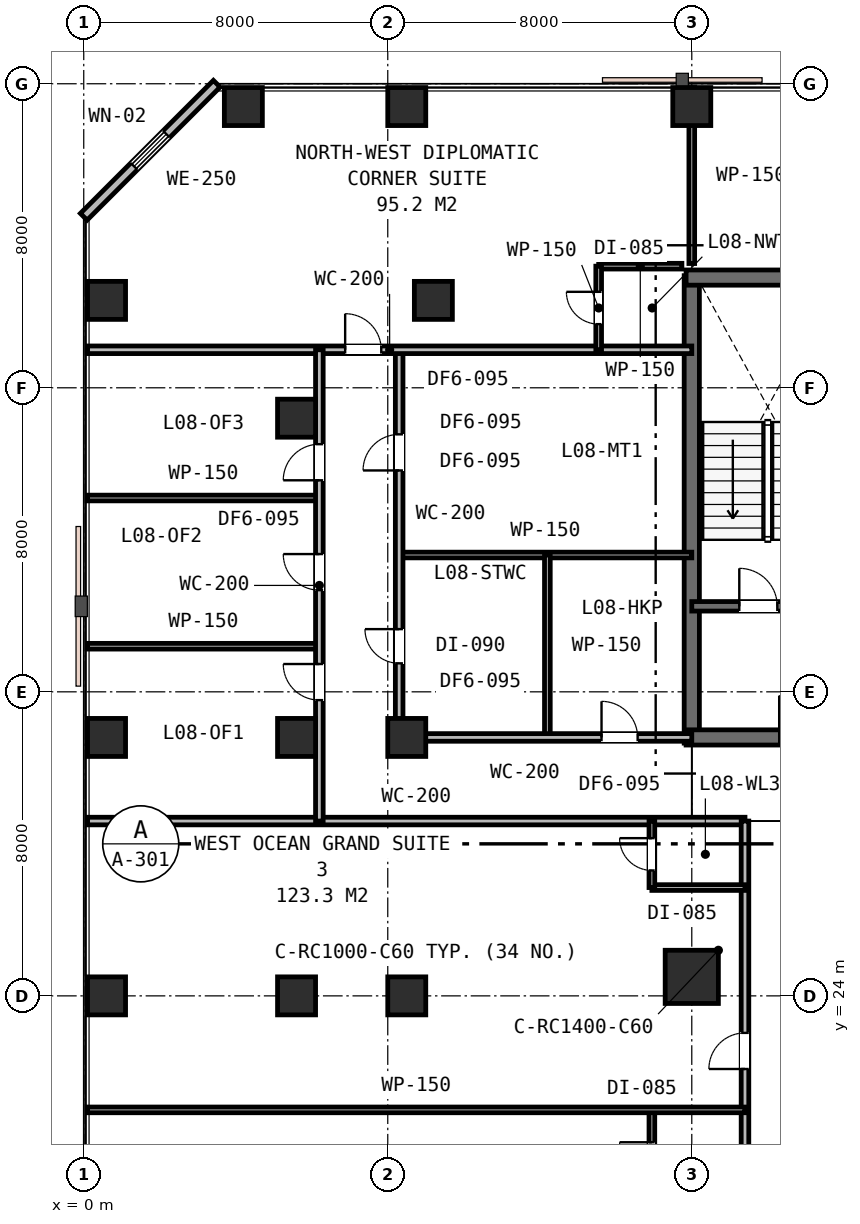
"""IFC4 building model, lengths in metres.
Left out: names, types, materials, properties, quantities, classifications, styles, units other than length and angle.
Written with IfcOpenShell. Run it as: python <this file> out.ifc"""

import sys

from ifc_helpers import new_model, si_unit, direction, frame, frame_2d, origin, origin_2d, place, context, subcontext, project, spatial, rectangle, extrude, element, fill, save


model = new_model("IFC4")
c1 = context("Model", 3, precision=1e-05, world=origin(), true_north=direction((0.0, 1.0)))
c2 = subcontext(c1, "Body", "Model", "MODEL_VIEW")
j1 = project(units=[si_unit("LENGTHUNIT", "METRE"), si_unit("PLANEANGLEUNIT", "RADIAN")], contexts=[c1])
p1 = place(None, origin())
s1 = spatial("IfcSite", under=j1, at=p1, CompositionType="ELEMENT")
p2 = place(p1, origin())
s2 = spatial("IfcBuilding", under=s1, at=p2, CompositionType="ELEMENT")
p3 = place(p2, frame((0.0, 0.0, 36.6)))
s3 = spatial("IfcBuildingStorey", under=s2, at=p3, CompositionType="ELEMENT", Elevation=36.6)
p4 = place(p3, frame((16.0, 30.65, 0.0), z_axis=(0.0, 0.0, 1.0), x_axis=(0.0, 1.0, 0.0)))
e1 = element("IfcWall", 1, at=p4, inside=s3, PredefinedType="SHEAR", context=c2, shape_type="SweptSolid", body=[
    extrude(rectangle(XDim=12.3, YDim=0.4, at=frame_2d((6.15, 0.0))), origin(), (0.0, 0.0, 1.0), 3.6),
])
p5 = place(p3, frame((15.85, 42.9, 0.0), z_axis=(0.0, 0.0, 1.0), x_axis=(1.0, 0.0, 0.0)))
e2 = element("IfcWall", 2, at=p5, inside=s3, PredefinedType="SHEAR", context=c2, shape_type="SweptSolid", body=[
    extrude(rectangle(XDim=24.3, YDim=0.4, at=frame_2d((12.15, 0.0))), origin(), (0.0, 0.0, 1.0), 3.6),
])
p6 = place(p3, frame((15.85, 30.8, 0.0), z_axis=(0.0, 0.0, 1.0), x_axis=(1.0, 0.0, 0.0)))
e3 = element("IfcWall", 3, at=p6, inside=s3, PredefinedType="SHEAR", context=c2, shape_type="SweptSolid", body=[
    extrude(rectangle(XDim=11.2, YDim=0.4, at=frame_2d((5.6, 0.0))), origin(), (0.0, 0.0, 1.0), 3.6),
])
p7 = place(p6, frame((2.45, 0.0, 0.0)))
e4 = element("IfcOpeningElement", 4, at=p7, cuts=e3, PredefinedType="OPENING", context=c2, shape_type="SweptSolid", body=[
    extrude(rectangle(XDim=1.1, YDim=2.15, at=frame_2d((0.55, 1.075))), frame((0.0, 0.21, 0.0), z_axis=(0.0, -1.0, 0.0), x_axis=(1.0, 0.0, 0.0)), (0.0, 0.0, 1.0), 0.42),
])
p8 = place(p3, frame((16.0, 34.25, 0.0), z_axis=(0.0, 0.0, 1.0), x_axis=(1.0, 0.0, 0.0)))
e5 = element("IfcWall", 5, at=p8, inside=s3, PredefinedType="SHEAR", context=c2, shape_type="SweptSolid", body=[
    extrude(rectangle(XDim=6.05, YDim=0.25, at=frame_2d((3.025, 0.0))), origin(), (0.0, 0.0, 1.0), 3.6),
])
p9 = place(p8, frame((1.25, 0.0, 0.0)))
e6 = element("IfcOpeningElement", 6, at=p9, cuts=e5, PredefinedType="OPENING", context=c2, shape_type="SweptSolid", body=[
    extrude(rectangle(XDim=1.0, YDim=2.15, at=frame_2d((0.5, 1.075))), frame((0.0, 0.135, 0.0), z_axis=(0.0, -1.0, 0.0), x_axis=(1.0, 0.0, 0.0)), (0.0, 0.0, 1.0), 0.27),
])
p10 = place(p8, frame((4.2, 0.0, 0.0)))
e7 = element("IfcOpeningElement", 7, at=p10, cuts=e5, PredefinedType="OPENING", context=c2, shape_type="SweptSolid", body=[
    extrude(rectangle(XDim=1.1, YDim=2.15, at=frame_2d((0.55, 1.075))), frame((0.0, 0.135, 0.0), z_axis=(0.0, -1.0, 0.0), x_axis=(1.0, 0.0, 0.0)), (0.0, 0.0, 1.0), 0.27),
])
p11 = place(p3, frame((8.5, 24.0, 0.0), z_axis=(0.0, 0.0, 1.0), x_axis=(1.0, 0.0, 0.0)))
e8 = element("IfcColumn", 8, at=p11, inside=s3, PredefinedType="COLUMN", context=c2, shape_type="SweptSolid", body=[
    extrude(rectangle(XDim=1.0, YDim=1.0, at=origin_2d()), origin(), (0.0, 0.0, 1.0), 3.6),
])
p12 = place(p3, frame((16.0, 24.5, 0.0), z_axis=(0.0, 0.0, 1.0), x_axis=(1.0, 0.0, 0.0)))
e9 = element("IfcColumn", 9, at=p12, inside=s3, PredefinedType="COLUMN", context=c2, shape_type="SweptSolid", body=[
    extrude(rectangle(XDim=1.4, YDim=1.4, at=origin_2d()), origin(), (0.0, 0.0, 1.0), 3.6),
])
for number, where, z_axis, x_axis in (
    (10, (5.6, 24.0, 0.0), (0.0, 0.0, 1.0), (1.0, 0.0, 0.0)),
    (11, (5.6, 30.8, 0.0), (0.0, 0.0, 1.0), (1.0, 0.0, 0.0)),
    (12, (5.6, 39.2, 0.0), (0.0, 0.0, 1.0), (1.0, 0.0, 0.0)),
    (13, (8.5, 30.8, 0.0), (0.0, 0.0, 1.0), (1.0, 0.0, 0.0)),
    (14, (9.2, 42.3, 0.0), (0.0, 0.0, 1.0), (1.0, 0.0, 0.0)),
    (15, (0.6, 24.0, 0.0), (0.0, 0.0, 1.0), (1.0, 0.0, 0.0)),
    (16, (0.6, 30.8, 0.0), (0.0, 0.0, 1.0), (1.0, 0.0, 0.0)),
    (17, (0.6, 42.3, 0.0), (0.0, 0.0, 1.0), (1.0, 0.0, 0.0)),
    (18, (4.2, 47.4, 0.0), (0.0, 0.0, 1.0), (1.0, 0.0, 0.0)),
    (19, (8.5, 47.4, 0.0), (0.0, 0.0, 1.0), (1.0, 0.0, 0.0)),
    (20, (16.0, 47.4, 0.0), (0.0, 0.0, 1.0), (1.0, 0.0, 0.0)),
):
    element("IfcColumn", number, at=place(p3, frame(where, z_axis=z_axis, x_axis=x_axis)), inside=s3, PredefinedType="COLUMN", context=c2, shape_type="SweptSolid", body=[
        extrude(rectangle(XDim=1.0, YDim=1.0, at=origin_2d()), origin(), (0.0, 0.0, 1.0), 3.6),
    ])
p13 = place(p3, frame((3.5, 48.0, 0.0), z_axis=(0.0, 0.0, 1.0), x_axis=(-0.707106781187, -0.707106781187, 0.0)))
e21 = element("IfcWall", 21, at=p13, inside=s3, PredefinedType="STANDARD", context=c2, shape_type="SweptSolid", body=[
    extrude(rectangle(XDim=4.95, YDim=0.25, at=frame_2d((2.475, 0.0))), origin(), (0.0, 0.0, 1.0), 3.33),
])
p14 = place(p13, frame((1.875, 0.0, 0.85)))
e22 = element("IfcOpeningElement", 22, at=p14, cuts=e21, PredefinedType="OPENING", context=c2, shape_type="SweptSolid", body=[
    extrude(rectangle(XDim=1.2, YDim=1.6, at=frame_2d((0.6, 0.8))), frame((0.0, 0.135, 0.0), z_axis=(0.0, -1.0, 0.0), x_axis=(1.0, 0.0, 0.0)), (0.0, 0.0, 1.0), 0.27),
])
p15 = place(p3, frame((0.1, 28.6, 0.0), z_axis=(0.0, 0.0, 1.0), x_axis=(1.0, 0.0, 0.0)))
e23 = element("IfcWall", 23, at=p15, inside=s3, PredefinedType="PARTITIONING", context=c2, shape_type="SweptSolid", body=[
    extrude(rectangle(XDim=17.3, YDim=0.2, at=frame_2d((8.65, 0.0))), origin(), (0.0, 0.0, 1.0), 2.82),
])
p16 = place(p3, frame((8.3, 35.6, 0.0), z_axis=(0.0, 0.0, 1.0), x_axis=(1.0, 0.0, 0.0)))
e24 = element("IfcWall", 24, at=p16, inside=s3, PredefinedType="PARTITIONING", context=c2, shape_type="SweptSolid", body=[
    extrude(rectangle(XDim=7.7, YDim=0.15, at=frame_2d((3.85, 0.0))), origin(), (0.0, 0.0, 1.0), 2.82),
])
p17 = place(p3, frame((12.2, 30.8, 0.0), z_axis=(0.0, 0.0, 1.0), x_axis=(0.0, 1.0, 0.0)))
e25 = element("IfcWall", 25, at=p17, inside=s3, PredefinedType="PARTITIONING", context=c2, shape_type="SweptSolid", body=[
    extrude(rectangle(XDim=4.8, YDim=0.15, at=frame_2d((2.4, 0.0))), origin(), (0.0, 0.0, 1.0), 2.82),
])
p18 = place(p3, frame((8.3, 30.8, 0.0), z_axis=(0.0, 0.0, 1.0), x_axis=(1.0, 0.0, 0.0)))
e26 = element("IfcWall", 26, at=p18, inside=s3, PredefinedType="PARTITIONING", context=c2, shape_type="SweptSolid", body=[
    extrude(rectangle(XDim=7.7, YDim=0.2, at=frame_2d((3.85, 0.0))), origin(), (0.0, 0.0, 1.0), 2.82),
])
p19 = place(p18, frame((5.325, 0.0, 0.0)))
e27 = element("IfcOpeningElement", 27, at=p19, cuts=e26, PredefinedType="OPENING", context=c2, shape_type="SweptSolid", body=[
    extrude(rectangle(XDim=0.95, YDim=2.15, at=frame_2d((0.475, 1.075))), frame((0.0, 0.11, 0.0), z_axis=(0.0, -1.0, 0.0), x_axis=(1.0, 0.0, 0.0)), (0.0, 0.0, 1.0), 0.22),
])
p20 = place(p3, frame((8.3, 30.8, 0.0), z_axis=(0.0, 0.0, 1.0), x_axis=(0.0, 1.0, 0.0)))
e28 = element("IfcWall", 28, at=p20, inside=s3, PredefinedType="PARTITIONING", context=c2, shape_type="SweptSolid", body=[
    extrude(rectangle(XDim=10.2, YDim=0.2, at=frame_2d((5.1, 0.0))), origin(), (0.0, 0.0, 1.0), 2.82),
])
p21 = place(p20, frame((1.95, 0.0, 0.0)))
e29 = element("IfcOpeningElement", 29, at=p21, cuts=e28, PredefinedType="OPENING", context=c2, shape_type="SweptSolid", body=[
    extrude(rectangle(XDim=0.9, YDim=2.15, at=frame_2d((0.45, 1.075))), frame((0.0, 0.11, 0.0), z_axis=(0.0, -1.0, 0.0), x_axis=(1.0, 0.0, 0.0)), (0.0, 0.0, 1.0), 0.22),
])
p22 = place(p20, frame((7.025, 0.0, 0.0)))
e30 = element("IfcOpeningElement", 30, at=p22, cuts=e28, PredefinedType="OPENING", context=c2, shape_type="SweptSolid", body=[
    extrude(rectangle(XDim=0.95, YDim=2.15, at=frame_2d((0.475, 1.075))), frame((0.0, 0.11, 0.0), z_axis=(0.0, -1.0, 0.0), x_axis=(1.0, 0.0, 0.0)), (0.0, 0.0, 1.0), 0.22),
])
p23 = place(p3, frame((0.1, 41.0, 0.0), z_axis=(0.0, 0.0, 1.0), x_axis=(1.0, 0.0, 0.0)))
e31 = element("IfcWall", 31, at=p23, inside=s3, PredefinedType="PARTITIONING", context=c2, shape_type="SweptSolid", body=[
    extrude(rectangle(XDim=15.9, YDim=0.2, at=frame_2d((7.95, 0.0))), origin(), (0.0, 0.0, 1.0), 2.82),
])
p24 = place(p23, frame((6.779, 0.0, 0.0)))
e32 = element("IfcOpeningElement", 32, at=p24, cuts=e31, PredefinedType="OPENING", context=c2, shape_type="SweptSolid", body=[
    extrude(rectangle(XDim=0.95, YDim=2.15, at=frame_2d((0.475, 1.075))), frame((0.0, 0.11, 0.0), z_axis=(0.0, -1.0, 0.0), x_axis=(1.0, 0.0, 0.0)), (0.0, 0.0, 1.0), 0.22),
])
p25 = place(p3, frame((13.55, 43.2, 0.0), z_axis=(0.0, 0.0, 1.0), x_axis=(1.0, 0.0, 0.0)))
e33 = element("IfcWall", 33, at=p25, inside=s3, PredefinedType="PARTITIONING", context=c2, shape_type="SweptSolid", body=[
    extrude(rectangle(XDim=2.19, YDim=0.15, at=frame_2d((1.095, 0.0))), origin(), (0.0, 0.0, 1.0), 3.33),
])
p26 = place(p3, frame((13.55, 41.0, 0.0), z_axis=(0.0, 0.0, 1.0), x_axis=(0.0, 1.0, 0.0)))
e34 = element("IfcWall", 34, at=p26, inside=s3, PredefinedType="PARTITIONING", context=c2, shape_type="SweptSolid", body=[
    extrude(rectangle(XDim=2.2, YDim=0.15, at=frame_2d((1.1, 0.0))), origin(), (0.0, 0.0, 1.0), 3.33),
])
p27 = place(p26, frame((0.675, 0.0, 0.0)))
e35 = element("IfcOpeningElement", 35, at=p27, cuts=e34, PredefinedType="OPENING", context=c2, shape_type="SweptSolid", body=[
    extrude(rectangle(XDim=0.85, YDim=2.15, at=frame_2d((0.425, 1.075))), frame((0.0, 0.085, 0.0), z_axis=(0.0, -1.0, 0.0), x_axis=(1.0, 0.0, 0.0)), (0.0, 0.0, 1.0), 0.17),
])
for number, where, z_axis, x_axis in (
    (36, (0.1, 33.2, 0.0), (0.0, 0.0, 1.0), (1.0, 0.0, 0.0)),
    (37, (0.1, 37.1, 0.0), (0.0, 0.0, 1.0), (1.0, 0.0, 0.0)),
):
    element("IfcWall", number, at=place(p3, frame(where, z_axis=z_axis, x_axis=x_axis)), inside=s3, PredefinedType="PARTITIONING", context=c2, shape_type="SweptSolid", body=[
        extrude(rectangle(XDim=6.1, YDim=0.15, at=frame_2d((3.05, 0.0))), origin(), (0.0, 0.0, 1.0), 2.82),
    ])
p28 = place(p3, frame((6.2, 28.6, 0.0), z_axis=(0.0, 0.0, 1.0), x_axis=(0.0, 1.0, 0.0)))
e38 = element("IfcWall", 38, at=p28, inside=s3, PredefinedType="PARTITIONING", context=c2, shape_type="SweptSolid", body=[
    extrude(rectangle(XDim=12.4, YDim=0.2, at=frame_2d((6.2, 0.0))), origin(), (0.0, 0.0, 1.0), 2.82),
])
p29 = place(p28, frame((3.182, 0.0, 0.0)))
e39 = element("IfcOpeningElement", 39, at=p29, cuts=e38, PredefinedType="OPENING", context=c2, shape_type="SweptSolid", body=[
    extrude(rectangle(XDim=0.95, YDim=2.15, at=frame_2d((0.475, 1.075))), frame((0.0, 0.11, 0.0), z_axis=(0.0, -1.0, 0.0), x_axis=(1.0, 0.0, 0.0)), (0.0, 0.0, 1.0), 0.22),
])
p30 = place(p28, frame((6.075, 0.0, 0.0)))
e40 = element("IfcOpeningElement", 40, at=p30, cuts=e38, PredefinedType="OPENING", context=c2, shape_type="SweptSolid", body=[
    extrude(rectangle(XDim=0.95, YDim=2.15, at=frame_2d((0.475, 1.075))), frame((0.0, 0.11, 0.0), z_axis=(0.0, -1.0, 0.0), x_axis=(1.0, 0.0, 0.0)), (0.0, 0.0, 1.0), 0.22),
])
p31 = place(p28, frame((8.966, 0.0, 0.0)))
e41 = element("IfcOpeningElement", 41, at=p31, cuts=e38, PredefinedType="OPENING", context=c2, shape_type="SweptSolid", body=[
    extrude(rectangle(XDim=0.95, YDim=2.15, at=frame_2d((0.475, 1.075))), frame((0.0, 0.11, 0.0), z_axis=(0.0, -1.0, 0.0), x_axis=(1.0, 0.0, 0.0)), (0.0, 0.0, 1.0), 0.22),
])
p32 = place(p3, frame((16.0, 43.27, 0.0), z_axis=(0.0, 0.0, 1.0), x_axis=(0.0, 1.0, 0.0)))
e42 = element("IfcWall", 42, at=p32, inside=s3, PredefinedType="PARTITIONING", context=c2, shape_type="SweptSolid", body=[
    extrude(rectangle(XDim=4.63, YDim=0.15, at=frame_2d((2.315, 0.0))), origin(), (0.0, 0.0, 1.0), 2.93),
])
p33 = place(p3, frame((17.4, 5.6, 0.0), z_axis=(0.0, 0.0, 1.0), x_axis=(0.0, 1.0, 0.0)))
e43 = element("IfcWall", 43, at=p33, inside=s3, PredefinedType="PARTITIONING", context=c2, shape_type="SweptSolid", body=[
    extrude(rectangle(XDim=23.0, YDim=0.2, at=frame_2d((11.5, 0.0))), origin(), (0.0, 0.0, 1.0), 2.82),
])
p34 = place(p33, frame((0.84, 0.0, 0.0)))
e44 = element("IfcOpeningElement", 44, at=p34, cuts=e43, PredefinedType="OPENING", context=c2, shape_type="SweptSolid", body=[
    extrude(rectangle(XDim=0.95, YDim=2.15, at=frame_2d((0.475, 1.075))), frame((0.0, 0.11, 0.0), z_axis=(0.0, -1.0, 0.0), x_axis=(1.0, 0.0, 0.0)), (0.0, 0.0, 1.0), 0.22),
])
p35 = place(p33, frame((8.983, 0.0, 0.0)))
e45 = element("IfcOpeningElement", 45, at=p35, cuts=e43, PredefinedType="OPENING", context=c2, shape_type="SweptSolid", body=[
    extrude(rectangle(XDim=0.95, YDim=2.15, at=frame_2d((0.475, 1.075))), frame((0.0, 0.11, 0.0), z_axis=(0.0, -1.0, 0.0), x_axis=(1.0, 0.0, 0.0)), (0.0, 0.0, 1.0), 0.22),
])
p36 = place(p33, frame((16.476, 0.0, 0.0)))
e46 = element("IfcOpeningElement", 46, at=p36, cuts=e43, PredefinedType="OPENING", context=c2, shape_type="SweptSolid", body=[
    extrude(rectangle(XDim=0.95, YDim=2.15, at=frame_2d((0.475, 1.075))), frame((0.0, 0.11, 0.0), z_axis=(0.0, -1.0, 0.0), x_axis=(1.0, 0.0, 0.0)), (0.0, 0.0, 1.0), 0.22),
])
p37 = place(p3, frame((14.95, 16.0, 0.0), z_axis=(0.0, 0.0, 1.0), x_axis=(0.0, 1.0, 0.0)))
e47 = element("IfcWall", 47, at=p37, inside=s3, PredefinedType="PARTITIONING", context=c2, shape_type="SweptSolid", body=[
    extrude(rectangle(XDim=5.0, YDim=0.15, at=frame_2d((2.5, 0.0))), origin(), (0.0, 0.0, 1.0), 2.82),
])
p38 = place(p37, frame((3.298, 0.0, 0.0)))
e48 = element("IfcOpeningElement", 48, at=p38, cuts=e47, PredefinedType="OPENING", context=c2, shape_type="SweptSolid", body=[
    extrude(rectangle(XDim=0.85, YDim=2.15, at=frame_2d((0.425, 1.075))), frame((0.0, 0.085, 0.0), z_axis=(0.0, -1.0, 0.0), x_axis=(1.0, 0.0, 0.0)), (0.0, 0.0, 1.0), 0.17),
])
p39 = place(p3, frame((0.1, 21.0, 0.0), z_axis=(0.0, 0.0, 1.0), x_axis=(1.0, 0.0, 0.0)))
e49 = element("IfcWall", 49, at=p39, inside=s3, PredefinedType="PARTITIONING", context=c2, shape_type="SweptSolid", body=[
    extrude(rectangle(XDim=17.3, YDim=0.15, at=frame_2d((8.65, 0.0))), origin(), (0.0, 0.0, 1.0), 2.82),
])
p40 = place(p3, frame((14.95, 26.85, 0.0), z_axis=(0.0, 0.0, 1.0), x_axis=(1.0, 0.0, 0.0)))
e50 = element("IfcWall", 50, at=p40, inside=s3, PredefinedType="PARTITIONING", context=c2, shape_type="SweptSolid", body=[
    extrude(rectangle(XDim=2.45, YDim=0.15, at=frame_2d((1.225, 0.0))), origin(), (0.0, 0.0, 1.0), 2.82),
])
p41 = place(p3, frame((14.95, 26.85, 0.0), z_axis=(0.0, 0.0, 1.0), x_axis=(0.0, 1.0, 0.0)))
e51 = element("IfcWall", 51, at=p41, inside=s3, PredefinedType="PARTITIONING", context=c2, shape_type="SweptSolid", body=[
    extrude(rectangle(XDim=1.75, YDim=0.15, at=frame_2d((0.875, 0.0))), origin(), (0.0, 0.0, 1.0), 3.33),
])
p42 = place(p41, frame((0.45, 0.0, 0.0)))
e52 = element("IfcOpeningElement", 52, at=p42, cuts=e51, PredefinedType="OPENING", context=c2, shape_type="SweptSolid", body=[
    extrude(rectangle(XDim=0.85, YDim=2.15, at=frame_2d((0.425, 1.075))), frame((0.0, 0.085, 0.0), z_axis=(0.0, -1.0, 0.0), x_axis=(1.0, 0.0, 0.0)), (0.0, 0.0, 1.0), 0.17),
])
p43 = place(p14, origin())
e53 = element("IfcWindow", 53, at=p43, inside=s3, PartitioningType="SINGLE_PANEL", PredefinedType="WINDOW", context=c2, shape_type="SweptSolid", body=[
    extrude(rectangle(XDim=1.2, YDim=1.6, at=frame_2d((0.6, 0.8))), frame((0.0, 0.03, 0.0), z_axis=(0.0, -1.0, 0.0), x_axis=(1.0, 0.0, 0.0)), (0.0, 0.0, 1.0), 0.06),
])
fill(e22, e53)
p44 = place(p9, origin())
e54 = element("IfcDoor", 54, at=p44, inside=s3, OperationType="SINGLE_SWING_LEFT", PredefinedType="DOOR", context=c2, shape_type="SweptSolid", body=[
    extrude(rectangle(XDim=1.0, YDim=2.15, at=frame_2d((0.5, 1.075))), frame((0.0, 0.025, 0.0), z_axis=(0.0, -1.0, 0.0), x_axis=(1.0, 0.0, 0.0)), (0.0, 0.0, 1.0), 0.05),
])
fill(e6, e54)
p45 = place(p7, origin())
e55 = element("IfcDoor", 55, at=p45, inside=s3, OperationType="SINGLE_SWING_LEFT", PredefinedType="DOOR", context=c2, shape_type="SweptSolid", body=[
    extrude(rectangle(XDim=1.1, YDim=2.15, at=frame_2d((0.55, 1.075))), frame((0.0, 0.025, 0.0), z_axis=(0.0, -1.0, 0.0), x_axis=(1.0, 0.0, 0.0)), (0.0, 0.0, 1.0), 0.05),
])
fill(e4, e55)
p46 = place(p19, origin())
e56 = element("IfcDoor", 56, at=p46, inside=s3, OperationType="SINGLE_SWING_LEFT", PredefinedType="DOOR", context=c2, shape_type="SweptSolid", body=[
    extrude(rectangle(XDim=0.95, YDim=2.15, at=frame_2d((0.475, 1.075))), frame((0.0, 0.025, 0.0), z_axis=(0.0, -1.0, 0.0), x_axis=(1.0, 0.0, 0.0)), (0.0, 0.0, 1.0), 0.05),
])
fill(e27, e56)
p47 = place(p21, origin())
e57 = element("IfcDoor", 57, at=p47, inside=s3, OperationType="SINGLE_SWING_RIGHT", PredefinedType="DOOR", context=c2, shape_type="SweptSolid", body=[
    extrude(rectangle(XDim=0.9, YDim=2.15, at=frame_2d((0.45, 1.075))), frame((0.0, 0.025, 0.0), z_axis=(0.0, -1.0, 0.0), x_axis=(1.0, 0.0, 0.0)), (0.0, 0.0, 1.0), 0.05),
])
fill(e29, e57)
p48 = place(p24, origin())
e58 = element("IfcDoor", 58, at=p48, inside=s3, OperationType="SINGLE_SWING_LEFT", PredefinedType="DOOR", context=c2, shape_type="SweptSolid", body=[
    extrude(rectangle(XDim=0.95, YDim=2.15, at=frame_2d((0.475, 1.075))), frame((0.0, 0.025, 0.0), z_axis=(0.0, -1.0, 0.0), x_axis=(1.0, 0.0, 0.0)), (0.0, 0.0, 1.0), 0.05),
])
fill(e32, e58)
p49 = place(p27, origin())
e59 = element("IfcDoor", 59, at=p49, inside=s3, OperationType="SINGLE_SWING_RIGHT", PredefinedType="DOOR", context=c2, shape_type="SweptSolid", body=[
    extrude(rectangle(XDim=0.85, YDim=2.15, at=frame_2d((0.425, 1.075))), frame((0.0, 0.025, 0.0), z_axis=(0.0, -1.0, 0.0), x_axis=(1.0, 0.0, 0.0)), (0.0, 0.0, 1.0), 0.05),
])
fill(e35, e59)
p50 = place(p29, origin())
e60 = element("IfcDoor", 60, at=p50, inside=s3, OperationType="SINGLE_SWING_RIGHT", PredefinedType="DOOR", context=c2, shape_type="SweptSolid", body=[
    extrude(rectangle(XDim=0.95, YDim=2.15, at=frame_2d((0.475, 1.075))), frame((0.0, 0.025, 0.0), z_axis=(0.0, -1.0, 0.0), x_axis=(1.0, 0.0, 0.0)), (0.0, 0.0, 1.0), 0.05),
])
fill(e39, e60)
p51 = place(p30, origin())
e61 = element("IfcDoor", 61, at=p51, inside=s3, OperationType="SINGLE_SWING_RIGHT", PredefinedType="DOOR", context=c2, shape_type="SweptSolid", body=[
    extrude(rectangle(XDim=0.95, YDim=2.15, at=frame_2d((0.475, 1.075))), frame((0.0, 0.025, 0.0), z_axis=(0.0, -1.0, 0.0), x_axis=(1.0, 0.0, 0.0)), (0.0, 0.0, 1.0), 0.05),
])
fill(e40, e61)
p52 = place(p31, origin())
e62 = element("IfcDoor", 62, at=p52, inside=s3, OperationType="SINGLE_SWING_LEFT", PredefinedType="DOOR", context=c2, shape_type="SweptSolid", body=[
    extrude(rectangle(XDim=0.95, YDim=2.15, at=frame_2d((0.475, 1.075))), frame((0.0, 0.025, 0.0), z_axis=(0.0, -1.0, 0.0), x_axis=(1.0, 0.0, 0.0)), (0.0, 0.0, 1.0), 0.05),
])
fill(e41, e62)
p53 = place(p22, origin())
e63 = element("IfcDoor", 63, at=p53, inside=s3, OperationType="SINGLE_SWING_LEFT", PredefinedType="DOOR", context=c2, shape_type="SweptSolid", body=[
    extrude(rectangle(XDim=0.95, YDim=2.15, at=frame_2d((0.475, 1.075))), frame((0.0, 0.025, 0.0), z_axis=(0.0, -1.0, 0.0), x_axis=(1.0, 0.0, 0.0)), (0.0, 0.0, 1.0), 0.05),
])
fill(e30, e63)
p54 = place(p38, origin())
e64 = element("IfcDoor", 64, at=p54, inside=s3, OperationType="SINGLE_SWING_RIGHT", PredefinedType="DOOR", context=c2, shape_type="SweptSolid", body=[
    extrude(rectangle(XDim=0.85, YDim=2.15, at=frame_2d((0.425, 1.075))), frame((0.0, 0.025, 0.0), z_axis=(0.0, -1.0, 0.0), x_axis=(1.0, 0.0, 0.0)), (0.0, 0.0, 1.0), 0.05),
])
fill(e48, e64)
p55 = place(p36, origin())
e65 = element("IfcDoor", 65, at=p55, inside=s3, OperationType="SINGLE_SWING_LEFT", PredefinedType="DOOR", context=c2, shape_type="SweptSolid", body=[
    extrude(rectangle(XDim=0.95, YDim=2.15, at=frame_2d((0.475, 1.075))), frame((0.0, 0.025, 0.0), z_axis=(0.0, -1.0, 0.0), x_axis=(1.0, 0.0, 0.0)), (0.0, 0.0, 1.0), 0.05),
])
fill(e46, e65)
p56 = place(p42, origin())
e66 = element("IfcDoor", 66, at=p56, inside=s3, OperationType="SINGLE_SWING_RIGHT", PredefinedType="DOOR", context=c2, shape_type="SweptSolid", body=[
    extrude(rectangle(XDim=0.85, YDim=2.15, at=frame_2d((0.425, 1.075))), frame((0.0, 0.025, 0.0), z_axis=(0.0, -1.0, 0.0), x_axis=(1.0, 0.0, 0.0)), (0.0, 0.0, 1.0), 0.05),
])
fill(e52, e66)
save(model, sys.argv[1])
